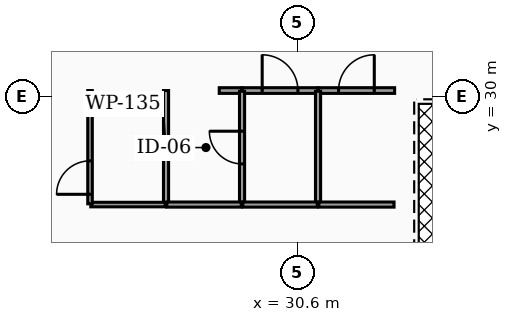
"""IFC4 building model, lengths in metres.
Left out: names, types, materials, properties, quantities, classifications, styles, units other than length and angle.
Written with IfcOpenShell. Run it as: python <this file> out.ifc"""

import sys

from ifc_helpers import new_model, si_unit, direction, frame, frame_2d, origin, place, context, subcontext, project, spatial, rectangle, extrude, element, fill, save


model = new_model("IFC4")
c1 = context("Model", 3, precision=1e-05, world=origin(), true_north=direction((0.0, 1.0)))
c2 = subcontext(c1, "Body", "Model", "MODEL_VIEW")
j1 = project(units=[si_unit("LENGTHUNIT", "METRE"), si_unit("PLANEANGLEUNIT", "RADIAN")], contexts=[c1])
p1 = place(None, origin())
s1 = spatial("IfcSite", under=j1, at=p1, CompositionType="ELEMENT")
p2 = place(p1, origin())
s2 = spatial("IfcBuilding", under=s1, at=p2, CompositionType="ELEMENT")
p3 = place(p2, frame((0.0, 0.0, 127.16)))
s3 = spatial("IfcBuildingStorey", under=s2, at=p3, CompositionType="ELEMENT", Elevation=127.16)
p4 = place(p3, frame((28.55, 30.15, 0.0), z_axis=(0.0, 0.0, 1.0), x_axis=(1.0, 0.0, 0.0)))
e1 = element("IfcWall", 1, at=p4, inside=s3, PredefinedType="PARTITIONING", context=c2, shape_type="SweptSolid", body=[
    extrude(rectangle(XDim=0.595, YDim=0.15, at=frame_2d((0.297, 0.0))), origin(), (0.0, 0.0, 1.0), 2.457),
])
p5 = place(p3, frame((29.155, 30.15, 0.0), z_axis=(0.0, 0.0, 1.0), x_axis=(1.0, 0.0, 0.0)))
e2 = element("IfcWall", 2, at=p5, inside=s3, PredefinedType="PARTITIONING", context=c2, shape_type="SweptSolid", body=[
    extrude(rectangle(XDim=1.99, YDim=0.15, at=frame_2d((0.995, 0.0))), origin(), (0.0, 0.0, 1.0), 2.457),
])
p6 = place(p5, frame((0.525, 0.0, 0.0)))
e3 = element("IfcOpeningElement", 3, at=p6, cuts=e2, PredefinedType="OPENING", context=c2, shape_type="SweptSolid", body=[
    extrude(rectangle(XDim=0.94, YDim=2.05, at=frame_2d((0.47, 1.025))), frame((0.0, 0.085, 0.0), z_axis=(0.0, -1.0, 0.0), x_axis=(1.0, 0.0, 0.0)), (0.0, 0.0, 1.0), 0.17),
])
p7 = place(p3, frame((31.155, 30.15, 0.0), z_axis=(0.0, 0.0, 1.0), x_axis=(1.0, 0.0, 0.0)))
e4 = element("IfcWall", 4, at=p7, inside=s3, PredefinedType="PARTITIONING", context=c2, shape_type="SweptSolid", body=[
    extrude(rectangle(XDim=2.01, YDim=0.15, at=frame_2d((1.005, 0.0))), origin(), (0.0, 0.0, 1.0), 2.457),
])
p8 = place(p7, frame((0.535, 0.0, 0.0)))
e5 = element("IfcOpeningElement", 5, at=p8, cuts=e4, PredefinedType="OPENING", context=c2, shape_type="SweptSolid", body=[
    extrude(rectangle(XDim=0.94, YDim=2.05, at=frame_2d((0.47, 1.025))), frame((0.0, 0.085, 0.0), z_axis=(0.0, -1.0, 0.0), x_axis=(1.0, 0.0, 0.0)), (0.0, 0.0, 1.0), 0.17),
])
p9 = place(p3, frame((27.15, 27.17, 0.0), z_axis=(0.0, 0.0, 1.0), x_axis=(0.0, 1.0, 0.0)))
e6 = element("IfcWall", 6, at=p9, inside=s3, PredefinedType="PARTITIONING", context=c2, shape_type="SweptSolid", body=[
    extrude(rectangle(XDim=2.98, YDim=0.135, at=frame_2d((1.49, 0.0))), origin(), (0.0, 0.0, 1.0), 2.457),
])
p10 = place(p3, frame((25.17, 27.15, 0.0), z_axis=(0.0, 0.0, 1.0), x_axis=(1.0, 0.0, 0.0)))
e7 = element("IfcWall", 7, at=p10, inside=s3, PredefinedType="PARTITIONING", context=c2, shape_type="SweptSolid", body=[
    extrude(rectangle(XDim=1.96, YDim=0.12, at=frame_2d((0.98, 0.0))), origin(), (0.0, 0.0, 1.0), 2.457),
])
p11 = place(p3, frame((25.15, 27.17, 0.0), z_axis=(0.0, 0.0, 1.0), x_axis=(0.0, 1.0, 0.0)))
e8 = element("IfcWall", 8, at=p11, inside=s3, PredefinedType="PARTITIONING", context=c2, shape_type="SweptSolid", body=[
    extrude(rectangle(XDim=2.98, YDim=0.12, at=frame_2d((1.49, 0.0))), origin(), (0.0, 0.0, 1.0), 2.457),
])
p12 = place(p11, frame((0.25, 0.0, 0.0)))
e9 = element("IfcOpeningElement", 9, at=p12, cuts=e8, PredefinedType="OPENING", context=c2, shape_type="SweptSolid", body=[
    extrude(rectangle(XDim=0.88, YDim=2.05, at=frame_2d((0.44, 1.025))), frame((0.0, 0.07, 0.0), z_axis=(0.0, -1.0, 0.0), x_axis=(1.0, 0.0, 0.0)), (0.0, 0.0, 1.0), 0.14),
])
p13 = place(p3, frame((29.15, 27.17, 0.0), z_axis=(0.0, 0.0, 1.0), x_axis=(0.0, 1.0, 0.0)))
e10 = element("IfcWall", 10, at=p13, inside=s3, PredefinedType="PARTITIONING", context=c2, shape_type="SweptSolid", body=[
    extrude(rectangle(XDim=2.96, YDim=0.135, at=frame_2d((1.48, 0.0))), origin(), (0.0, 0.0, 1.0), 2.457),
])
p14 = place(p13, frame((1.05, 0.0, 0.0)))
e11 = element("IfcOpeningElement", 11, at=p14, cuts=e10, PredefinedType="OPENING", context=c2, shape_type="SweptSolid", body=[
    extrude(rectangle(XDim=0.86, YDim=2.05, at=frame_2d((0.43, 1.025))), frame((0.0, 0.077, 0.0), z_axis=(0.0, -1.0, 0.0), x_axis=(1.0, 0.0, 0.0)), (0.0, 0.0, 1.0), 0.155),
])
p15 = place(p3, frame((27.17, 27.15, 0.0), z_axis=(0.0, 0.0, 1.0), x_axis=(1.0, 0.0, 0.0)))
e12 = element("IfcWall", 12, at=p15, inside=s3, PredefinedType="PARTITIONING", context=c2, shape_type="SweptSolid", body=[
    extrude(rectangle(XDim=1.96, YDim=0.135, at=frame_2d((0.98, 0.0))), origin(), (0.0, 0.0, 1.0), 2.457),
])
p16 = place(p3, frame((31.15, 27.17, 0.0), z_axis=(0.0, 0.0, 1.0), x_axis=(0.0, 1.0, 0.0)))
e13 = element("IfcWall", 13, at=p16, inside=s3, PredefinedType="PARTITIONING", context=c2, shape_type="SweptSolid", body=[
    extrude(rectangle(XDim=2.96, YDim=0.135, at=frame_2d((1.48, 0.0))), origin(), (0.0, 0.0, 1.0), 2.457),
])
p17 = place(p3, frame((29.17, 27.15, 0.0), z_axis=(0.0, 0.0, 1.0), x_axis=(1.0, 0.0, 0.0)))
e14 = element("IfcWall", 14, at=p17, inside=s3, PredefinedType="PARTITIONING", context=c2, shape_type="SweptSolid", body=[
    extrude(rectangle(XDim=1.96, YDim=0.135, at=frame_2d((0.98, 0.0))), origin(), (0.0, 0.0, 1.0), 2.457),
])
p18 = place(p3, frame((31.17, 27.15, 0.0), z_axis=(0.0, 0.0, 1.0), x_axis=(1.0, 0.0, 0.0)))
e15 = element("IfcWall", 15, at=p18, inside=s3, PredefinedType="PARTITIONING", context=c2, shape_type="SweptSolid", body=[
    extrude(rectangle(XDim=1.98, YDim=0.135, at=frame_2d((0.99, 0.0))), origin(), (0.0, 0.0, 1.0), 2.457),
])
p19 = place(p6, origin())
e16 = element("IfcDoor", 16, at=p19, inside=s3, OperationType="SINGLE_SWING_LEFT", PredefinedType="DOOR", context=c2, shape_type="SweptSolid", body=[
    extrude(rectangle(XDim=0.94, YDim=2.05, at=frame_2d((0.47, 1.025))), frame((0.0, 0.025, 0.0), z_axis=(0.0, -1.0, 0.0), x_axis=(1.0, 0.0, 0.0)), (0.0, 0.0, 1.0), 0.05),
])
fill(e3, e16)
p20 = place(p8, origin())
e17 = element("IfcDoor", 17, at=p20, inside=s3, OperationType="SINGLE_SWING_RIGHT", PredefinedType="DOOR", context=c2, shape_type="SweptSolid", body=[
    extrude(rectangle(XDim=0.94, YDim=2.05, at=frame_2d((0.47, 1.025))), frame((0.0, 0.025, 0.0), z_axis=(0.0, -1.0, 0.0), x_axis=(1.0, 0.0, 0.0)), (0.0, 0.0, 1.0), 0.05),
])
fill(e5, e17)
p21 = place(p12, origin())
e18 = element("IfcDoor", 18, at=p21, inside=s3, OperationType="SINGLE_SWING_LEFT", PredefinedType="DOOR", context=c2, shape_type="SweptSolid", body=[
    extrude(rectangle(XDim=0.88, YDim=2.05, at=frame_2d((0.44, 1.025))), frame((0.0, 0.025, 0.0), z_axis=(0.0, -1.0, 0.0), x_axis=(1.0, 0.0, 0.0)), (0.0, 0.0, 1.0), 0.05),
])
fill(e9, e18)
p22 = place(p14, origin())
e19 = element("IfcDoor", 19, at=p22, inside=s3, OperationType="SINGLE_SWING_RIGHT", PredefinedType="DOOR", context=c2, shape_type="SweptSolid", body=[
    extrude(rectangle(XDim=0.86, YDim=2.05, at=frame_2d((0.43, 1.025))), frame((0.0, 0.025, 0.0), z_axis=(0.0, -1.0, 0.0), x_axis=(1.0, 0.0, 0.0)), (0.0, 0.0, 1.0), 0.05),
])
fill(e11, e19)
save(model, sys.argv[1])
